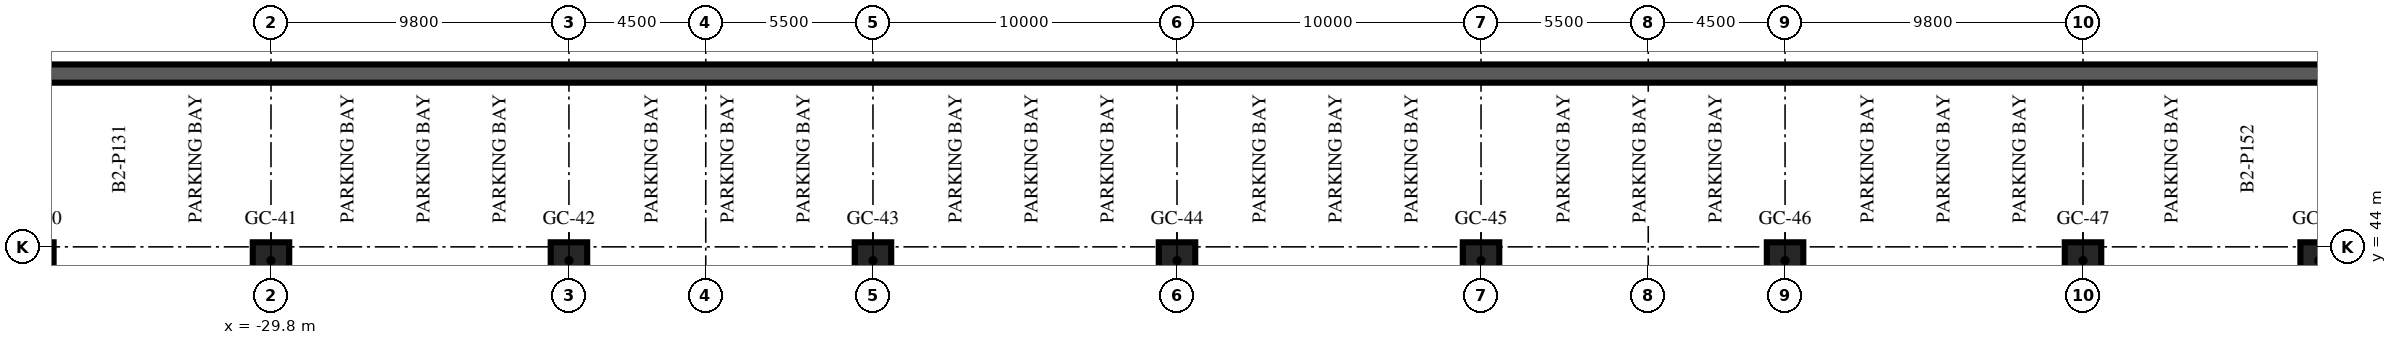
"""IFC4 building model, lengths in metres.
Left out: names, types, materials, properties, quantities, classifications, styles, units other than length and angle.
Written with IfcOpenShell. Run it as: python <this file> out.ifc"""

import sys

from ifc_helpers import new_model, si_unit, direction, frame, frame_2d, origin, origin_2d, place, context, subcontext, project, spatial, rectangle, extrude, element, save


model = new_model("IFC4")
c1 = context("Model", 3, precision=1e-05, world=origin(), true_north=direction((0.0, 1.0)))
c2 = subcontext(c1, "Body", "Model", "MODEL_VIEW")
j1 = project(units=[si_unit("LENGTHUNIT", "METRE"), si_unit("PLANEANGLEUNIT", "RADIAN")], contexts=[c1])
p1 = place(None, origin())
s1 = spatial("IfcSite", under=j1, at=p1, CompositionType="ELEMENT")
p2 = place(p1, origin())
s2 = spatial("IfcBuilding", under=s1, at=p2, CompositionType="ELEMENT")
p3 = place(p2, frame((0.0, 0.0, -9.0)))
s3 = spatial("IfcBuildingStorey", under=s2, at=p3, CompositionType="ELEMENT", Elevation=-9.0)
p4 = place(p3, frame((-46.0, 49.7, -0.3), z_axis=(0.0, 0.0, 1.0), x_axis=(1.0, 0.0, 0.0)))
e1 = element("IfcWall", 1, at=p4, inside=s3, PredefinedType="SOLIDWALL", context=c2, shape_type="SweptSolid", body=[
    extrude(rectangle(XDim=92.0, YDim=0.6, at=frame_2d((46.0, 0.0))), origin(), (0.0, 0.0, 1.0), 3.6),
])
for number, where, z_axis, x_axis in (
    (2, (-37.55, 43.55, 0.0), (0.0, 0.0, 1.0), (1.0, 0.0, 0.0)),
    (3, (-29.8, 43.55, 0.0), (0.0, 0.0, 1.0), (1.0, 0.0, 0.0)),
    (4, (-20.0, 43.55, 0.0), (0.0, 0.0, 1.0), (1.0, 0.0, 0.0)),
    (5, (-10.0, 43.55, 0.0), (0.0, 0.0, 1.0), (1.0, 0.0, 0.0)),
    (6, (0.0, 43.55, 0.0), (0.0, 0.0, 1.0), (1.0, 0.0, 0.0)),
    (7, (10.0, 43.55, 0.0), (0.0, 0.0, 1.0), (1.0, 0.0, 0.0)),
    (8, (20.0, 43.55, 0.0), (0.0, 0.0, 1.0), (1.0, 0.0, 0.0)),
    (9, (29.8, 43.55, 0.0), (0.0, 0.0, 1.0), (1.0, 0.0, 0.0)),
    (10, (37.55, 43.55, 0.0), (0.0, 0.0, 1.0), (1.0, 0.0, 0.0)),
):
    element("IfcColumn", number, at=place(p3, frame(where, z_axis=z_axis, x_axis=x_axis)), inside=s3, PredefinedType="COLUMN", context=c2, shape_type="SweptSolid", body=[
        extrude(rectangle(XDim=1.2, YDim=1.2, at=origin_2d()), origin(), (0.0, 0.0, 1.0), 3.6),
    ])
save(model, sys.argv[1])
